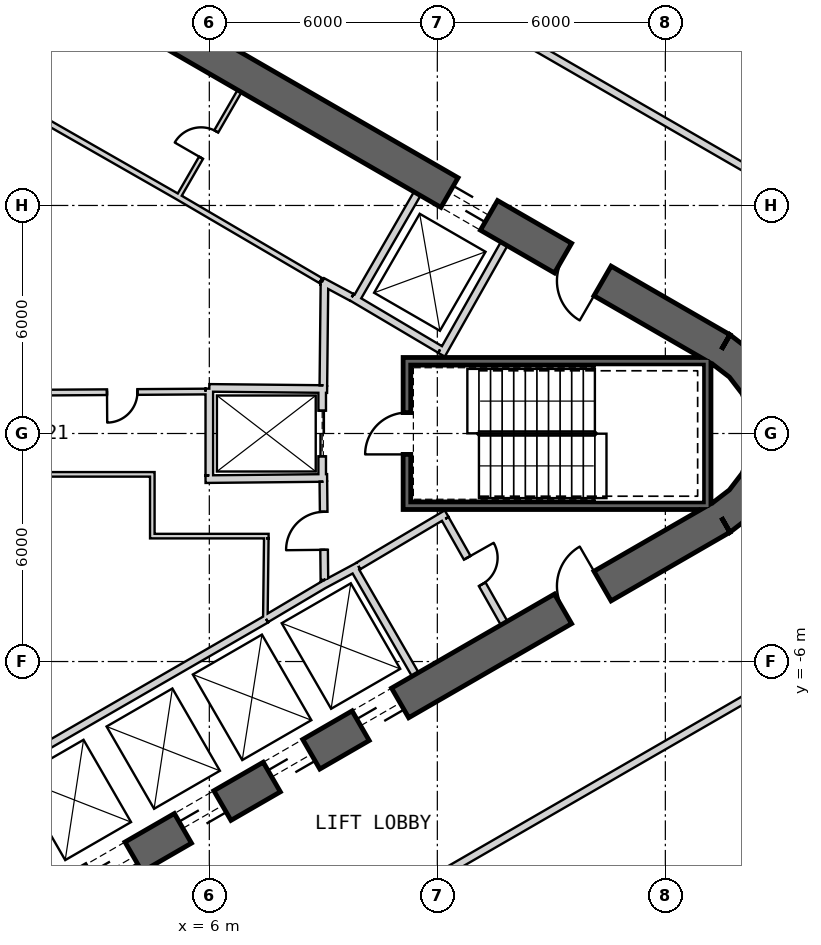
"""IFC4 building model, lengths in metres.
Left out: names, types, materials, properties, quantities, classifications, styles, units other than length and angle.
Written with IfcOpenShell. Run it as: python <this file> out.ifc"""

import sys

from ifc_helpers import new_model, si_unit, direction, frame, frame_2d, origin, place, context, subcontext, project, spatial, polyline, rectangle, outline, extrude, element, fill, save


model = new_model("IFC4")
c1 = context("Model", 3, precision=1e-05, world=origin(), true_north=direction((0.0, 1.0)))
c2 = subcontext(c1, "Body", "Model", "MODEL_VIEW")
j1 = project(units=[si_unit("LENGTHUNIT", "METRE"), si_unit("PLANEANGLEUNIT", "RADIAN")], contexts=[c1])
p1 = place(None, origin())
s1 = spatial("IfcSite", under=j1, at=p1, CompositionType="ELEMENT")
p2 = place(p1, origin())
s2 = spatial("IfcBuilding", under=s1, at=p2, CompositionType="ELEMENT")
p3 = place(p2, frame((0.0, 0.0, 169.2)))
s3 = spatial("IfcBuildingStorey", under=s2, at=p3, CompositionType="ELEMENT", Elevation=169.2)
p4 = place(p3, frame((19.475, 2.208, 0.0), z_axis=(0.0, 0.0, 1.0), x_axis=(-0.866028369851, 0.499994862586, 0.0)))
e1 = element("IfcWall", 1, at=p4, inside=s3, PredefinedType="SHEAR", context=c2, shape_type="SweptSolid", body=[
    extrude(rectangle(XDim=31.523, YDim=0.9, at=frame_2d((15.762, 0.0))), origin(), (0.0, 0.0, 1.0), 4.0),
])
p5 = place(p4, frame((7.062, 0.0, 0.0)))
e2 = element("IfcOpeningElement", 2, at=p5, cuts=e1, PredefinedType="OPENING", context=c2, shape_type="SweptSolid", body=[
    extrude(rectangle(XDim=1.2, YDim=2.4, at=frame_2d((0.6, 1.2))), frame((0.0, 0.46, 0.0), z_axis=(0.0, -1.0, 0.0), x_axis=(1.0, 0.0, 0.0)), (0.0, 0.0, 1.0), 0.92),
])
p6 = place(p4, frame((3.612, 0.0, 0.0)))
e3 = element("IfcOpeningElement", 3, at=p6, cuts=e1, PredefinedType="OPENING", context=c2, shape_type="SweptSolid", body=[
    extrude(rectangle(XDim=1.2, YDim=2.4, at=frame_2d((0.6, 1.2))), frame((0.0, 0.46, 0.0), z_axis=(0.0, -1.0, 0.0), x_axis=(1.0, 0.0, 0.0)), (0.0, 0.0, 1.0), 0.92),
])
p7 = place(p4, frame((26.712, 0.0, 0.0)))
e4 = element("IfcOpeningElement", 4, at=p7, cuts=e1, PredefinedType="OPENING", context=c2, shape_type="SweptSolid", body=[
    extrude(rectangle(XDim=1.2, YDim=2.4, at=frame_2d((0.6, 1.2))), frame((0.0, 0.46, 0.0), z_axis=(0.0, -1.0, 0.0), x_axis=(1.0, 0.0, 0.0)), (0.0, 0.0, 1.0), 0.92),
])
p8 = place(p3, frame((-7.825, -17.97, 0.0), z_axis=(0.0, 0.0, 1.0), x_axis=(0.866028369851, 0.499994862586, 0.0)))
e5 = element("IfcWall", 5, at=p8, inside=s3, PredefinedType="SHEAR", context=c2, shape_type="SweptSolid", body=[
    extrude(rectangle(XDim=31.523, YDim=0.9, at=frame_2d((15.762, 0.0))), origin(), (0.0, 0.0, 1.0), 4.0),
])
p9 = place(p8, frame((7.062, 0.0, 0.0)))
e6 = element("IfcOpeningElement", 6, at=p9, cuts=e5, PredefinedType="OPENING", context=c2, shape_type="SweptSolid", body=[
    extrude(rectangle(XDim=1.2, YDim=2.4, at=frame_2d((0.6, 1.2))), frame((0.0, 0.46, 0.0), z_axis=(0.0, -1.0, 0.0), x_axis=(1.0, 0.0, 0.0)), (0.0, 0.0, 1.0), 0.92),
])
p10 = place(p8, frame((9.762, 0.0, 0.0)))
e7 = element("IfcOpeningElement", 7, at=p10, cuts=e5, PredefinedType="OPENING", context=c2, shape_type="SweptSolid", body=[
    extrude(rectangle(XDim=1.2, YDim=2.4, at=frame_2d((0.6, 1.2))), frame((0.0, 0.46, 0.0), z_axis=(0.0, -1.0, 0.0), x_axis=(1.0, 0.0, 0.0)), (0.0, 0.0, 1.0), 0.92),
])
p11 = place(p8, frame((12.462, 0.0, 0.0)))
e8 = element("IfcOpeningElement", 8, at=p11, cuts=e5, PredefinedType="OPENING", context=c2, shape_type="SweptSolid", body=[
    extrude(rectangle(XDim=1.2, YDim=2.4, at=frame_2d((0.6, 1.2))), frame((0.0, 0.46, 0.0), z_axis=(0.0, -1.0, 0.0), x_axis=(1.0, 0.0, 0.0)), (0.0, 0.0, 1.0), 0.92),
])
p12 = place(p8, frame((15.162, 0.0, 0.0)))
e9 = element("IfcOpeningElement", 9, at=p12, cuts=e5, PredefinedType="OPENING", context=c2, shape_type="SweptSolid", body=[
    extrude(rectangle(XDim=1.2, YDim=2.4, at=frame_2d((0.6, 1.2))), frame((0.0, 0.46, 0.0), z_axis=(0.0, -1.0, 0.0), x_axis=(1.0, 0.0, 0.0)), (0.0, 0.0, 1.0), 0.92),
])
p13 = place(p8, frame((17.862, 0.0, 0.0)))
e10 = element("IfcOpeningElement", 10, at=p13, cuts=e5, PredefinedType="OPENING", context=c2, shape_type="SweptSolid", body=[
    extrude(rectangle(XDim=1.2, YDim=2.4, at=frame_2d((0.6, 1.2))), frame((0.0, 0.46, 0.0), z_axis=(0.0, -1.0, 0.0), x_axis=(1.0, 0.0, 0.0)), (0.0, 0.0, 1.0), 0.92),
])
p14 = place(p8, frame((20.562, 0.0, 0.0)))
e11 = element("IfcOpeningElement", 11, at=p14, cuts=e5, PredefinedType="OPENING", context=c2, shape_type="SweptSolid", body=[
    extrude(rectangle(XDim=1.2, YDim=2.4, at=frame_2d((0.6, 1.2))), frame((0.0, 0.46, 0.0), z_axis=(0.0, -1.0, 0.0), x_axis=(1.0, 0.0, 0.0)), (0.0, 0.0, 1.0), 0.92),
])
p15 = place(p8, frame((26.712, 0.0, 0.0)))
e12 = element("IfcOpeningElement", 12, at=p15, cuts=e5, PredefinedType="OPENING", context=c2, shape_type="SweptSolid", body=[
    extrude(rectangle(XDim=1.2, YDim=2.4, at=frame_2d((0.6, 1.2))), frame((0.0, 0.46, 0.0), z_axis=(0.0, -1.0, 0.0), x_axis=(1.0, 0.0, 0.0)), (0.0, 0.0, 1.0), 0.92),
])
p16 = place(p8, frame((3.612, 0.0, 0.0)))
e13 = element("IfcOpeningElement", 13, at=p16, cuts=e5, PredefinedType="OPENING", context=c2, shape_type="SweptSolid", body=[
    extrude(rectangle(XDim=1.2, YDim=2.4, at=frame_2d((0.6, 1.2))), frame((0.0, 0.46, 0.0), z_axis=(0.0, -1.0, 0.0), x_axis=(1.0, 0.0, 0.0)), (0.0, 0.0, 1.0), 0.92),
])
p17 = place(p3, origin())
e14 = element("IfcWall", 14, at=p17, inside=s3, PredefinedType="SHEAR", context=c2, shape_type="SweptSolid", body=[
    extrude(outline(polyline([(19.7, -2.598), (20.321, -2.121), (20.798, -1.5), (21.098, -0.777), (21.2, 0.0), (21.098, 0.777), (20.798, 1.5), (20.321, 2.121), (19.7, 2.598), (19.25, 1.819), (19.685, 1.485), (20.019, 1.05), (20.229, 0.543), (20.3, 0.0), (20.229, -0.543), (20.019, -1.05), (19.685, -1.485), (19.25, -1.819), (19.7, -2.598)])), origin(), (0.0, 0.0, 1.0), 4.0),
])
p18 = place(p3, frame((9.847, 3.495, 0.0), z_axis=(0.0, 0.0, 1.0), x_axis=(0.499984717929, 0.866034226713, 0.0)))
e15 = element("IfcWall", 15, at=p18, inside=s3, PredefinedType="PLUMBINGWALL", context=c2, shape_type="SweptSolid", body=[
    extrude(rectangle(XDim=3.25, YDim=0.2, at=frame_2d((1.625, 0.0))), origin(), (0.0, 0.0, 1.0), 3.7),
])
p19 = place(p3, frame((12.11, 2.073, 0.0), z_axis=(0.0, 0.0, 1.0), x_axis=(0.49196600604, 0.870614408852, 0.0)))
e16 = element("IfcWall", 16, at=p19, inside=s3, PredefinedType="PLUMBINGWALL", context=c2, shape_type="SweptSolid", body=[
    extrude(rectangle(XDim=3.35, YDim=0.2, at=frame_2d((1.675, 0.0))), origin(), (0.0, 0.0, 1.0), 3.7),
])
p20 = place(p3, frame((12.073, 2.211, 0.0), z_axis=(0.0, 0.0, 1.0), x_axis=(-0.860414880418, 0.509594185166, 0.0)))
e17 = element("IfcWall", 17, at=p20, inside=s3, PredefinedType="PLUMBINGWALL", context=c2, shape_type="SweptSolid", body=[
    extrude(rectangle(XDim=2.7, YDim=0.2, at=frame_2d((1.35, 0.0))), origin(), (0.0, 0.0, 1.0), 3.7),
])
p21 = place(p3, frame((0.483, -8.936, 0.0), z_axis=(0.0, 0.0, 1.0), x_axis=(0.866030989016, 0.499990325971, 0.0)))
e18 = element("IfcWall", 18, at=p21, inside=s3, PredefinedType="PLUMBINGWALL", context=c2, shape_type="SweptSolid", body=[
    extrude(rectangle(XDim=8.1, YDim=0.2, at=frame_2d((4.05, 0.0))), origin(), (0.0, 0.0, 1.0), 3.7),
])
p22 = place(p3, frame((9.795, -3.525, 0.0), z_axis=(0.0, 0.0, 1.0), x_axis=(0.499984717929, -0.866034226713, 0.0)))
e19 = element("IfcWall", 19, at=p22, inside=s3, PredefinedType="PLUMBINGWALL", context=c2, shape_type="SweptSolid", body=[
    extrude(rectangle(XDim=3.25, YDim=0.2, at=frame_2d((1.625, 0.0))), origin(), (0.0, 0.0, 1.0), 3.7),
])
p23 = place(p3, frame((8.974, -3.999, 0.0), z_axis=(0.0, 0.0, 1.0), x_axis=(0.880907015104, 0.473289373154, 0.0)))
e20 = element("IfcWall", 20, at=p23, inside=s3, PredefinedType="PLUMBINGWALL", context=c2, shape_type="SweptSolid", body=[
    extrude(rectangle(XDim=1.078, YDim=0.2, at=frame_2d((0.539, 0.0))), origin(), (0.0, 0.0, 1.0), 3.7),
])
p24 = place(p3, frame((7.493, -4.878, 0.0), z_axis=(0.0, 0.0, 1.0), x_axis=(0.859981807212, 0.510324691999, 0.0)))
e21 = element("IfcWall", 21, at=p24, inside=s3, PredefinedType="PLUMBINGWALL", context=c2, shape_type="SweptSolid", body=[
    extrude(rectangle(XDim=1.845, YDim=0.2, at=frame_2d((0.922, 0.0))), origin(), (0.0, 0.0, 1.0), 3.7),
])
p25 = place(p3, frame((19.2, 1.9, -0.3), z_axis=(0.0, 0.0, 1.0), x_axis=(-1.0, 0.0, 0.0)))
e22 = element("IfcWall", 22, at=p25, inside=s3, PredefinedType="SHEAR", context=c2, shape_type="SweptSolid", body=[
    extrude(rectangle(XDim=8.1, YDim=0.2, at=frame_2d((4.05, 0.0))), origin(), (0.0, 0.0, 1.0), 4.0),
])
p26 = place(p3, frame((19.1, -2.0, -0.3), z_axis=(0.0, 0.0, 1.0), x_axis=(0.0, 1.0, 0.0)))
e23 = element("IfcWall", 23, at=p26, inside=s3, PredefinedType="SHEAR", context=c2, shape_type="SweptSolid", body=[
    extrude(rectangle(XDim=3.8, YDim=0.2, at=frame_2d((1.9, 0.0))), origin(), (0.0, 0.0, 1.0), 4.0),
])
p27 = place(p3, frame((11.1, -1.9, -0.3), z_axis=(0.0, 0.0, 1.0), x_axis=(1.0, 0.0, 0.0)))
e24 = element("IfcWall", 24, at=p27, inside=s3, PredefinedType="SHEAR", context=c2, shape_type="SweptSolid", body=[
    extrude(rectangle(XDim=7.9, YDim=0.2, at=frame_2d((3.95, 0.0))), origin(), (0.0, 0.0, 1.0), 4.0),
])
p28 = place(p3, frame((11.2, -1.8, -0.3), z_axis=(0.0, 0.0, 1.0), x_axis=(0.0, 1.0, 0.0)))
e25 = element("IfcWall", 25, at=p28, inside=s3, PredefinedType="SHEAR", context=c2, shape_type="SweptSolid", body=[
    extrude(rectangle(XDim=3.6, YDim=0.2, at=frame_2d((1.8, 0.0))), origin(), (0.0, 0.0, 1.0), 4.0),
])
p29 = place(p28, frame((1.25, 0.0, 0.3)))
e26 = element("IfcOpeningElement", 26, at=p29, cuts=e25, PredefinedType="OPENING", context=c2, shape_type="SweptSolid", body=[
    extrude(rectangle(XDim=1.1, YDim=2.1, at=frame_2d((0.55, 1.05))), frame((0.0, 0.11, 0.0), z_axis=(0.0, -1.0, 0.0), x_axis=(1.0, 0.0, 0.0)), (0.0, 0.0, 1.0), 0.22),
])
p30 = place(p3, frame((8.97, 1.2, 0.0), z_axis=(0.0, 0.0, 1.0), x_axis=(0.0, -1.0, 0.0)))
e27 = element("IfcWall", 27, at=p30, inside=s3, PredefinedType="PLUMBINGWALL", context=c2, shape_type="SweptSolid", body=[
    extrude(rectangle(XDim=2.4, YDim=0.2, at=frame_2d((1.2, 0.0))), origin(), (0.0, 0.0, 1.0), 3.7),
])
p31 = place(p30, frame((0.6, 0.0, 0.0)))
e28 = element("IfcOpeningElement", 28, at=p31, cuts=e27, PredefinedType="OPENING", context=c2, shape_type="SweptSolid", body=[
    extrude(rectangle(XDim=1.2, YDim=2.4, at=frame_2d((0.6, 1.2))), frame((0.0, 0.11, 0.0), z_axis=(0.0, -1.0, 0.0), x_axis=(1.0, 0.0, 0.0)), (0.0, 0.0, 1.0), 0.22),
])
p32 = place(p3, frame((6.0, 1.2, 0.0), z_axis=(0.0, 0.0, 1.0), x_axis=(0.999949988, -0.010001074852, 0.0)))
e29 = element("IfcWall", 29, at=p32, inside=s3, PredefinedType="PLUMBINGWALL", context=c2, shape_type="SweptSolid", body=[
    extrude(rectangle(XDim=3.1, YDim=0.2, at=frame_2d((1.55, 0.0))), origin(), (0.0, 0.0, 1.0), 3.7),
])
p33 = place(p3, frame((5.9, -1.201, 0.0), z_axis=(0.0, 0.0, 1.0), x_axis=(0.999950064753, 0.009993397809, 0.0)))
e30 = element("IfcWall", 30, at=p33, inside=s3, PredefinedType="PLUMBINGWALL", context=c2, shape_type="SweptSolid", body=[
    extrude(rectangle(XDim=3.2, YDim=0.2, at=frame_2d((1.6, 0.0))), origin(), (0.0, 0.0, 1.0), 3.7),
])
p34 = place(p3, frame((6.0, -1.1, 0.0), z_axis=(0.0, 0.0, 1.0), x_axis=(0.0, 1.0, 0.0)))
e31 = element("IfcWall", 31, at=p34, inside=s3, PredefinedType="PLUMBINGWALL", context=c2, shape_type="SweptSolid", body=[
    extrude(rectangle(XDim=2.28, YDim=0.2, at=frame_2d((1.14, 0.0))), origin(), (0.0, 0.0, 1.0), 3.7),
])
p35 = place(p3, frame((5.17, 6.195, 0.0), z_axis=(0.0, 0.0, 1.0), x_axis=(0.499984717929, 0.866034226713, 0.0)))
e32 = element("IfcWall", 32, at=p35, inside=s3, PredefinedType="PARTITIONING", context=c2, shape_type="SweptSolid", body=[
    extrude(rectangle(XDim=3.25, YDim=0.12, at=frame_2d((1.625, 0.0))), origin(), (0.0, 0.0, 1.0), 3.7),
])
p36 = place(p35, frame((1.225, 0.0, 0.0)))
e33 = element("IfcOpeningElement", 33, at=p36, cuts=e32, PredefinedType="OPENING", context=c2, shape_type="SweptSolid", body=[
    extrude(rectangle(XDim=0.8, YDim=2.1, at=frame_2d((0.4, 1.05))), frame((0.0, 0.07, 0.0), z_axis=(0.0, -1.0, 0.0), x_axis=(1.0, 0.0, 0.0)), (0.0, 0.0, 1.0), 0.14),
])
p37 = place(p3, frame((8.974, 3.999, 0.0), z_axis=(0.0, 0.0, 1.0), x_axis=(0.880917147855, -0.473270513147, 0.0)))
e34 = element("IfcWall", 34, at=p37, inside=s3, PredefinedType="PARTITIONING", context=c2, shape_type="SweptSolid", body=[
    extrude(rectangle(XDim=0.878, YDim=0.2, at=frame_2d((0.439, 0.0))), origin(), (0.0, 0.0, 1.0), 3.7),
])
p38 = place(p3, frame((8.931, 4.025, 0.0), z_axis=(0.0, 0.0, 1.0), x_axis=(-0.862666884027, 0.505772525157, 0.0)))
e35 = element("IfcWall", 35, at=p38, inside=s3, PredefinedType="PLUMBINGWALL", context=c2, shape_type="SweptSolid", body=[
    extrude(rectangle(XDim=4.372, YDim=0.15, at=frame_2d((2.186, 0.0))), origin(), (0.0, 0.0, 1.0), 3.7),
])
p39 = place(p3, frame((5.159, 6.236, 0.0), z_axis=(0.0, 0.0, 1.0), x_axis=(-0.868105023632, 0.496380567654, 0.0)))
e36 = element("IfcWall", 36, at=p39, inside=s3, PredefinedType="PLUMBINGWALL", context=c2, shape_type="SweptSolid", body=[
    extrude(rectangle(XDim=7.072, YDim=0.15, at=frame_2d((3.536, 0.0))), origin(), (0.0, 0.0, 1.0), 3.7),
])
p40 = place(p3, frame((12.245, -2.109, 0.0), z_axis=(0.0, 0.0, 1.0), x_axis=(-0.860414880418, -0.509594185166, 0.0)))
e37 = element("IfcWall", 37, at=p40, inside=s3, PredefinedType="PARTITIONING", context=c2, shape_type="SweptSolid", body=[
    extrude(rectangle(XDim=2.7, YDim=0.2, at=frame_2d((1.35, 0.0))), origin(), (0.0, 0.0, 1.0), 3.7),
])
p41 = place(p3, frame((13.758, -4.99, 0.0), z_axis=(0.0, 0.0, 1.0), x_axis=(-0.491993409184, 0.87059892334, 0.0)))
e38 = element("IfcWall", 38, at=p41, inside=s3, PredefinedType="PARTITIONING", context=c2, shape_type="SweptSolid", body=[
    extrude(rectangle(XDim=3.15, YDim=0.2, at=frame_2d((1.575, 0.0))), origin(), (0.0, 0.0, 1.0), 3.7),
])
p42 = place(p41, frame((1.175, 0.0, 0.0)))
e39 = element("IfcOpeningElement", 39, at=p42, cuts=e38, PredefinedType="OPENING", context=c2, shape_type="SweptSolid", body=[
    extrude(rectangle(XDim=0.8, YDim=2.1, at=frame_2d((0.4, 1.05))), frame((0.0, 0.11, 0.0), z_axis=(0.0, -1.0, 0.0), x_axis=(1.0, 0.0, 0.0)), (0.0, 0.0, 1.0), 0.22),
])
p43 = place(p3, frame((9.001, 1.27, 0.0), z_axis=(0.0, 0.0, 1.0), x_axis=(0.01074821465, 0.999942236273, 0.0)))
e40 = element("IfcWall", 40, at=p43, inside=s3, PredefinedType="PARTITIONING", context=c2, shape_type="SweptSolid", body=[
    extrude(rectangle(XDim=2.726, YDim=0.2, at=frame_2d((1.363, 0.0))), origin(), (0.0, 0.0, 1.0), 3.7),
])
p44 = place(p3, frame((9.029, -3.851, 0.0), z_axis=(0.0, 0.0, 1.0), x_axis=(-0.010783593937, 0.99994185536, 0.0)))
e41 = element("IfcWall", 41, at=p44, inside=s3, PredefinedType="PARTITIONING", context=c2, shape_type="SweptSolid", body=[
    extrude(rectangle(XDim=2.581, YDim=0.2, at=frame_2d((1.291, 0.0))), origin(), (0.0, 0.0, 1.0), 3.7),
])
p45 = place(p44, frame((0.791, 0.0, 0.0)))
e42 = element("IfcOpeningElement", 42, at=p45, cuts=e41, PredefinedType="OPENING", context=c2, shape_type="SweptSolid", body=[
    extrude(rectangle(XDim=1.0, YDim=2.1, at=frame_2d((0.5, 1.05))), frame((0.0, 0.11, 0.0), z_axis=(0.0, -1.0, 0.0), x_axis=(1.0, 0.0, 0.0)), (0.0, 0.0, 1.0), 0.22),
])
p46 = place(p3, frame((1.388, 1.074, 0.0), z_axis=(0.0, 0.0, 1.0), x_axis=(0.99997856967, 0.006546770205, 0.0)))
e43 = element("IfcWall", 43, at=p46, inside=s3, PredefinedType="PLUMBINGWALL", context=c2, shape_type="SweptSolid", body=[
    extrude(rectangle(XDim=4.512, YDim=0.15, at=frame_2d((2.256, 0.0))), origin(), (0.0, 0.0, 1.0), 3.7),
])
p47 = place(p46, frame((1.92, 0.0, 0.0)))
e44 = element("IfcOpeningElement", 44, at=p47, cuts=e43, PredefinedType="OPENING", context=c2, shape_type="SweptSolid", body=[
    extrude(rectangle(XDim=0.8, YDim=2.1, at=frame_2d((0.4, 1.05))), frame((0.0, 0.085, 0.0), z_axis=(0.0, -1.0, 0.0), x_axis=(1.0, 0.0, 0.0)), (0.0, 0.0, 1.0), 0.17),
])
p48 = place(p3, frame((4.56, -1.075, 0.0), z_axis=(0.0, 0.0, 1.0), x_axis=(-1.0, 0.0, 0.0)))
e45 = element("IfcWall", 45, at=p48, inside=s3, PredefinedType="PARTITIONING", context=c2, shape_type="SweptSolid", body=[
    extrude(rectangle(XDim=3.026, YDim=0.12, at=frame_2d((1.513, 0.0))), origin(), (0.0, 0.0, 1.0), 3.7),
])
p49 = place(p3, frame((4.5, -2.76, 0.0), z_axis=(0.0, 0.0, 1.0), x_axis=(0.0, 1.0, 0.0)))
e46 = element("IfcWall", 46, at=p49, inside=s3, PredefinedType="PARTITIONING", context=c2, shape_type="SweptSolid", body=[
    extrude(rectangle(XDim=1.625, YDim=0.12, at=frame_2d((0.812, 0.0))), origin(), (0.0, 0.0, 1.0), 3.7),
])
p50 = place(p3, frame((7.56, -2.7, 0.0), z_axis=(0.0, 0.0, 1.0), x_axis=(-1.0, 0.0, 0.0)))
e47 = element("IfcWall", 47, at=p50, inside=s3, PredefinedType="PARTITIONING", context=c2, shape_type="SweptSolid", body=[
    extrude(rectangle(XDim=3.0, YDim=0.12, at=frame_2d((1.5, 0.0))), origin(), (0.0, 0.0, 1.0), 3.7),
])
p51 = place(p3, frame((7.475, -4.865, 0.0), z_axis=(0.0, 0.0, 1.0), x_axis=(0.011716133148, 0.999931363757, 0.0)))
e48 = element("IfcWall", 48, at=p51, inside=s3, PredefinedType="PARTITIONING", context=c2, shape_type="SweptSolid", body=[
    extrude(rectangle(XDim=2.105, YDim=0.12, at=frame_2d((1.052, 0.0))), origin(), (0.0, 0.0, 1.0), 3.7),
])
p52 = place(p3, frame((22.466, 5.62, 0.0), z_axis=(0.0, 0.0, 1.0), x_axis=(-0.866024667879, 0.500001274624, 0.0)))
e49 = element("IfcWall", 49, at=p52, inside=s3, PredefinedType="PARTITIONING", context=c2, shape_type="SweptSolid", body=[
    extrude(rectangle(XDim=18.696, YDim=0.2, at=frame_2d((9.348, 0.0))), origin(), (0.0, 0.0, 1.0), 2.88),
])
p53 = place(p3, frame((6.275, -14.968, 0.0), z_axis=(0.0, 0.0, 1.0), x_axis=(0.866028424491, 0.499994767946, 0.0)))
e50 = element("IfcWall", 50, at=p53, inside=s3, PredefinedType="PARTITIONING", context=c2, shape_type="SweptSolid", body=[
    extrude(rectangle(XDim=18.496, YDim=0.2, at=frame_2d((9.248, 0.0))), origin(), (0.0, 0.0, 1.0), 2.88),
])
p54 = place(p29, origin())
e51 = element("IfcDoor", 51, at=p54, inside=s3, OperationType="SINGLE_SWING_LEFT", PredefinedType="USERDEFINED", context=c2, shape_type="SweptSolid", body=[
    extrude(rectangle(XDim=1.1, YDim=2.1, at=frame_2d((0.55, 1.05))), frame((0.0, 0.025, 0.0), z_axis=(0.0, -1.0, 0.0), x_axis=(1.0, 0.0, 0.0)), (0.0, 0.0, 1.0), 0.05),
])
fill(e26, e51)
p55 = place(p45, origin())
e52 = element("IfcDoor", 52, at=p55, inside=s3, OperationType="SINGLE_SWING_LEFT", PredefinedType="USERDEFINED", context=c2, shape_type="SweptSolid", body=[
    extrude(rectangle(XDim=1.0, YDim=2.1, at=frame_2d((0.5, 1.05))), frame((0.0, 0.025, 0.0), z_axis=(0.0, -1.0, 0.0), x_axis=(1.0, 0.0, 0.0)), (0.0, 0.0, 1.0), 0.05),
])
fill(e42, e52)
p56 = place(p31, origin())
e53 = element("IfcDoor", 53, at=p56, inside=s3, OperationType="SLIDING_TO_LEFT", PredefinedType="USERDEFINED", context=c2, shape_type="SweptSolid", body=[
    extrude(rectangle(XDim=1.2, YDim=2.4, at=frame_2d((0.6, 1.2))), frame((0.0, 0.025, 0.0), z_axis=(0.0, -1.0, 0.0), x_axis=(1.0, 0.0, 0.0)), (0.0, 0.0, 1.0), 0.05),
])
fill(e28, e53)
p57 = place(p47, origin())
e54 = element("IfcDoor", 54, at=p57, inside=s3, OperationType="SINGLE_SWING_RIGHT", PredefinedType="USERDEFINED", context=c2, shape_type="SweptSolid", body=[
    extrude(rectangle(XDim=0.8, YDim=2.1, at=frame_2d((0.4, 1.05))), frame((0.0, 0.025, 0.0), z_axis=(0.0, -1.0, 0.0), x_axis=(1.0, 0.0, 0.0)), (0.0, 0.0, 1.0), 0.05),
])
fill(e44, e54)
p58 = place(p36, origin())
e55 = element("IfcDoor", 55, at=p58, inside=s3, OperationType="SINGLE_SWING_LEFT", PredefinedType="USERDEFINED", context=c2, shape_type="SweptSolid", body=[
    extrude(rectangle(XDim=0.8, YDim=2.1, at=frame_2d((0.4, 1.05))), frame((0.0, 0.025, 0.0), z_axis=(0.0, -1.0, 0.0), x_axis=(1.0, 0.0, 0.0)), (0.0, 0.0, 1.0), 0.05),
])
fill(e33, e55)
p59 = place(p42, origin())
e56 = element("IfcDoor", 56, at=p59, inside=s3, OperationType="SINGLE_SWING_LEFT", PredefinedType="USERDEFINED", context=c2, shape_type="SweptSolid", body=[
    extrude(rectangle(XDim=0.8, YDim=2.1, at=frame_2d((0.4, 1.05))), frame((0.0, 0.025, 0.0), z_axis=(0.0, -1.0, 0.0), x_axis=(1.0, 0.0, 0.0)), (0.0, 0.0, 1.0), 0.05),
])
fill(e39, e56)
p60 = place(p5, origin())
e57 = element("IfcDoor", 57, at=p60, inside=s3, OperationType="SLIDING_TO_LEFT", PredefinedType="USERDEFINED", context=c2, shape_type="SweptSolid", body=[
    extrude(rectangle(XDim=1.2, YDim=2.4, at=frame_2d((0.6, 1.2))), frame((0.0, 0.025, 0.0), z_axis=(0.0, -1.0, 0.0), x_axis=(1.0, 0.0, 0.0)), (0.0, 0.0, 1.0), 0.05),
])
fill(e2, e57)
p61 = place(p11, origin())
e58 = element("IfcDoor", 58, at=p61, inside=s3, OperationType="SLIDING_TO_LEFT", PredefinedType="USERDEFINED", context=c2, shape_type="SweptSolid", body=[
    extrude(rectangle(XDim=1.2, YDim=2.4, at=frame_2d((0.6, 1.2))), frame((0.0, 0.025, 0.0), z_axis=(0.0, -1.0, 0.0), x_axis=(1.0, 0.0, 0.0)), (0.0, 0.0, 1.0), 0.05),
])
fill(e8, e58)
p62 = place(p12, origin())
e59 = element("IfcDoor", 59, at=p62, inside=s3, OperationType="SLIDING_TO_LEFT", PredefinedType="USERDEFINED", context=c2, shape_type="SweptSolid", body=[
    extrude(rectangle(XDim=1.2, YDim=2.4, at=frame_2d((0.6, 1.2))), frame((0.0, 0.025, 0.0), z_axis=(0.0, -1.0, 0.0), x_axis=(1.0, 0.0, 0.0)), (0.0, 0.0, 1.0), 0.05),
])
fill(e9, e59)
p63 = place(p13, origin())
e60 = element("IfcDoor", 60, at=p63, inside=s3, OperationType="SLIDING_TO_LEFT", PredefinedType="USERDEFINED", context=c2, shape_type="SweptSolid", body=[
    extrude(rectangle(XDim=1.2, YDim=2.4, at=frame_2d((0.6, 1.2))), frame((0.0, 0.025, 0.0), z_axis=(0.0, -1.0, 0.0), x_axis=(1.0, 0.0, 0.0)), (0.0, 0.0, 1.0), 0.05),
])
fill(e10, e60)
p64 = place(p14, origin())
e61 = element("IfcDoor", 61, at=p64, inside=s3, OperationType="SLIDING_TO_LEFT", PredefinedType="USERDEFINED", context=c2, shape_type="SweptSolid", body=[
    extrude(rectangle(XDim=1.2, YDim=2.4, at=frame_2d((0.6, 1.2))), frame((0.0, 0.025, 0.0), z_axis=(0.0, -1.0, 0.0), x_axis=(1.0, 0.0, 0.0)), (0.0, 0.0, 1.0), 0.05),
])
fill(e11, e61)
p65 = place(p15, origin())
e62 = element("IfcDoor", 62, at=p65, inside=s3, OperationType="SINGLE_SWING_RIGHT", PredefinedType="USERDEFINED", context=c2, shape_type="SweptSolid", body=[
    extrude(rectangle(XDim=1.2, YDim=2.4, at=frame_2d((0.6, 1.2))), frame((0.0, 0.025, 0.0), z_axis=(0.0, -1.0, 0.0), x_axis=(1.0, 0.0, 0.0)), (0.0, 0.0, 1.0), 0.05),
])
fill(e12, e62)
p66 = place(p6, origin())
e63 = element("IfcDoor", 63, at=p66, inside=s3, OperationType="SINGLE_SWING_LEFT", PredefinedType="USERDEFINED", context=c2, shape_type="SweptSolid", body=[
    extrude(rectangle(XDim=1.2, YDim=2.4, at=frame_2d((0.6, 1.2))), frame((0.0, 0.025, 0.0), z_axis=(0.0, -1.0, 0.0), x_axis=(1.0, 0.0, 0.0)), (0.0, 0.0, 1.0), 0.05),
])
fill(e3, e63)
save(model, sys.argv[1])
